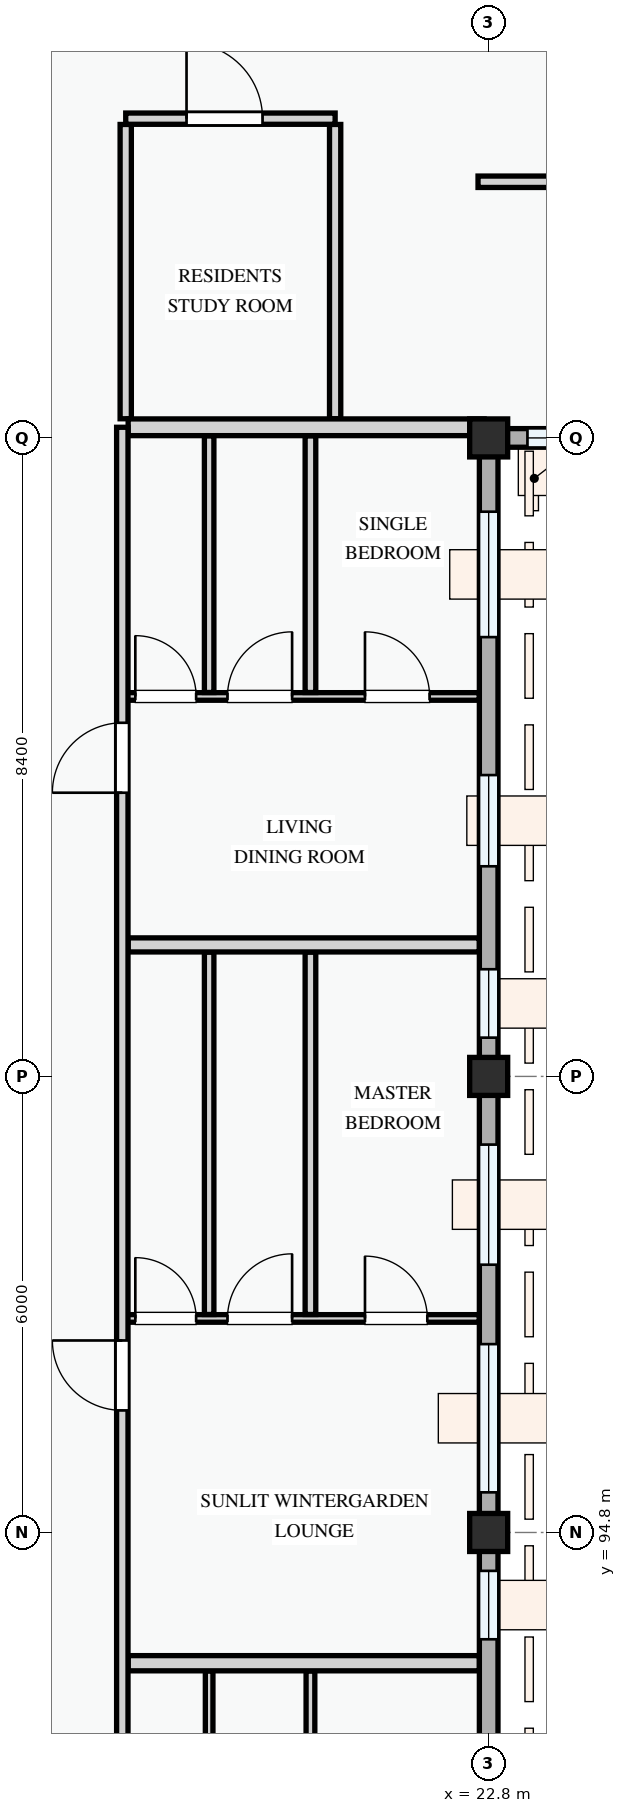
"""IFC4 building model, lengths in metres.
Left out: names, types, materials, properties, quantities, classifications, styles, units other than length and angle.
Written with IfcOpenShell. Run it as: python <this file> out.ifc"""

import sys

from ifc_helpers import new_model, si_unit, direction, frame, frame_2d, origin, origin_2d, place, context, subcontext, project, spatial, rectangle, extrude, element, fill, save


model = new_model("IFC4")
c1 = context("Model", 3, precision=1e-05, world=origin(), true_north=direction((0.0, 1.0)))
c2 = subcontext(c1, "Body", "Model", "MODEL_VIEW")
j1 = project(units=[si_unit("LENGTHUNIT", "METRE"), si_unit("PLANEANGLEUNIT", "RADIAN")], contexts=[c1])
p1 = place(None, origin())
s1 = spatial("IfcSite", under=j1, at=p1, CompositionType="ELEMENT")
p2 = place(p1, origin())
s2 = spatial("IfcBuilding", under=s1, at=p2, CompositionType="ELEMENT")
p3 = place(p2, frame((0.0, 0.0, 41.1)))
s3 = spatial("IfcBuildingStorey", under=s2, at=p3, CompositionType="ELEMENT", Elevation=41.1)
for number, where, z_axis, x_axis in (
    (1, (22.8, 94.8, 0.0), (0.0, 0.0, 1.0), (1.0, 0.0, 0.0)),
    (2, (22.8, 100.8, 0.0), (0.0, 0.0, 1.0), (1.0, 0.0, 0.0)),
    (3, (22.8, 109.2, 0.0), (0.0, 0.0, 1.0), (1.0, 0.0, 0.0)),
):
    element("IfcColumn", number, at=place(p3, frame(where, z_axis=z_axis, x_axis=x_axis)), inside=s3, PredefinedType="COLUMN", context=c2, shape_type="SweptSolid", body=[
        extrude(rectangle(XDim=0.5, YDim=0.5, at=origin_2d()), origin(), (0.0, 0.0, 1.0), 3.3),
    ])
p4 = place(p3, frame((22.8, 109.2, 0.0), z_axis=(0.0, 0.0, 1.0), x_axis=(1.0, 0.0, 0.0)))
e4 = element("IfcWall", 4, at=p4, inside=s3, PredefinedType="STANDARD", context=c2, shape_type="SweptSolid", body=[
    extrude(rectangle(XDim=6.0, YDim=0.245, at=frame_2d((3.0, 0.0))), origin(), (0.0, 0.0, 1.0), 2.525),
])
p5 = place(p4, frame((0.51, 0.0, 0.78)))
e5 = element("IfcOpeningElement", 5, at=p5, cuts=e4, PredefinedType="OPENING", context=c2, shape_type="SweptSolid", body=[
    extrude(rectangle(XDim=1.52, YDim=1.42, at=frame_2d((0.76, 0.71))), frame((0.0, 0.133, 0.0), z_axis=(0.0, -1.0, 0.0), x_axis=(1.0, 0.0, 0.0)), (0.0, 0.0, 1.0), 0.265),
])
p6 = place(p4, frame((2.955, 0.0, 0.78)))
e6 = element("IfcOpeningElement", 6, at=p6, cuts=e4, PredefinedType="OPENING", context=c2, shape_type="SweptSolid", body=[
    extrude(rectangle(XDim=2.25, YDim=1.6, at=frame_2d((1.125, 0.8))), frame((0.0, 0.133, 0.0), z_axis=(0.0, -1.0, 0.0), x_axis=(1.0, 0.0, 0.0)), (0.0, 0.0, 1.0), 0.265),
])
p7 = place(p3, frame((22.8, 86.4, 0.0), z_axis=(0.0, 0.0, 1.0), x_axis=(0.0, 1.0, 0.0)))
e7 = element("IfcWall", 7, at=p7, inside=s3, PredefinedType="STANDARD", context=c2, shape_type="SweptSolid", body=[
    extrude(rectangle(XDim=8.4, YDim=0.245, at=frame_2d((4.2, 0.0))), origin(), (0.0, 0.0, 1.0), 2.425),
])
p8 = place(p7, frame((0.814, 0.0, 0.78)))
e8 = element("IfcOpeningElement", 8, at=p8, cuts=e7, PredefinedType="OPENING", context=c2, shape_type="SweptSolid", body=[
    extrude(rectangle(XDim=1.8, YDim=1.5, at=frame_2d((0.9, 0.75))), frame((0.0, 0.133, 0.0), z_axis=(0.0, -1.0, 0.0), x_axis=(1.0, 0.0, 0.0)), (0.0, 0.0, 1.0), 0.265),
])
p9 = place(p7, frame((4.409, 0.0, 0.78)))
e9 = element("IfcOpeningElement", 9, at=p9, cuts=e7, PredefinedType="OPENING", context=c2, shape_type="SweptSolid", body=[
    extrude(rectangle(XDim=1.1, YDim=1.3, at=frame_2d((0.55, 0.65))), frame((0.0, 0.133, 0.0), z_axis=(0.0, -1.0, 0.0), x_axis=(1.0, 0.0, 0.0)), (0.0, 0.0, 1.0), 0.265),
])
p10 = place(p7, frame((6.995, 0.0, 0.78)))
e10 = element("IfcOpeningElement", 10, at=p10, cuts=e7, PredefinedType="OPENING", context=c2, shape_type="SweptSolid", body=[
    extrude(rectangle(XDim=0.9, YDim=1.2, at=frame_2d((0.45, 0.6))), frame((0.0, 0.133, 0.0), z_axis=(0.0, -1.0, 0.0), x_axis=(1.0, 0.0, 0.0)), (0.0, 0.0, 1.0), 0.265),
])
p11 = place(p3, frame((22.8, 94.8, 0.0), z_axis=(0.0, 0.0, 1.0), x_axis=(0.0, 1.0, 0.0)))
e11 = element("IfcWall", 11, at=p11, inside=s3, PredefinedType="STANDARD", context=c2, shape_type="SweptSolid", body=[
    extrude(rectangle(XDim=6.0, YDim=0.245, at=frame_2d((3.0, 0.0))), origin(), (0.0, 0.0, 1.0), 2.575),
])
p12 = place(p11, frame((0.528, 0.0, 0.78)))
e12 = element("IfcOpeningElement", 12, at=p12, cuts=e11, PredefinedType="OPENING", context=c2, shape_type="SweptSolid", body=[
    extrude(rectangle(XDim=1.95, YDim=1.65, at=frame_2d((0.975, 0.825))), frame((0.0, 0.133, 0.0), z_axis=(0.0, -1.0, 0.0), x_axis=(1.0, 0.0, 0.0)), (0.0, 0.0, 1.0), 0.265),
])
p13 = place(p11, frame((3.523, 0.0, 0.78)))
e13 = element("IfcOpeningElement", 13, at=p13, cuts=e11, PredefinedType="OPENING", context=c2, shape_type="SweptSolid", body=[
    extrude(rectangle(XDim=1.58, YDim=1.48, at=frame_2d((0.79, 0.74))), frame((0.0, 0.133, 0.0), z_axis=(0.0, -1.0, 0.0), x_axis=(1.0, 0.0, 0.0)), (0.0, 0.0, 1.0), 0.265),
])
p14 = place(p3, frame((22.8, 100.8, 0.0), z_axis=(0.0, 0.0, 1.0), x_axis=(0.0, 1.0, 0.0)))
e14 = element("IfcWall", 14, at=p14, inside=s3, PredefinedType="STANDARD", context=c2, shape_type="SweptSolid", body=[
    extrude(rectangle(XDim=8.4, YDim=0.245, at=frame_2d((4.2, 0.0))), origin(), (0.0, 0.0, 1.0), 2.425),
])
p15 = place(p14, frame((0.51, 0.0, 0.78)))
e15 = element("IfcOpeningElement", 15, at=p15, cuts=e14, PredefinedType="OPENING", context=c2, shape_type="SweptSolid", body=[
    extrude(rectangle(XDim=0.9, YDim=1.2, at=frame_2d((0.45, 0.6))), frame((0.0, 0.133, 0.0), z_axis=(0.0, -1.0, 0.0), x_axis=(1.0, 0.0, 0.0)), (0.0, 0.0, 1.0), 0.265),
])
p16 = place(p14, frame((2.764, 0.0, 0.78)))
e16 = element("IfcOpeningElement", 16, at=p16, cuts=e14, PredefinedType="OPENING", context=c2, shape_type="SweptSolid", body=[
    extrude(rectangle(XDim=1.2, YDim=1.5, at=frame_2d((0.6, 0.75))), frame((0.0, 0.133, 0.0), z_axis=(0.0, -1.0, 0.0), x_axis=(1.0, 0.0, 0.0)), (0.0, 0.0, 1.0), 0.265),
])
p17 = place(p14, frame((5.779, 0.0, 0.78)))
e17 = element("IfcOpeningElement", 17, at=p17, cuts=e14, PredefinedType="OPENING", context=c2, shape_type="SweptSolid", body=[
    extrude(rectangle(XDim=1.65, YDim=1.5, at=frame_2d((0.825, 0.75))), frame((0.0, 0.133, 0.0), z_axis=(0.0, -1.0, 0.0), x_axis=(1.0, 0.0, 0.0)), (0.0, 0.0, 1.0), 0.265),
])
for number, where, z_axis, x_axis in (
    (18, (18.025, 113.324, 0.0), (0.0, 0.0, 1.0), (0.0, -1.0, 0.0)),
    (19, (20.78, 113.324, 0.0), (0.0, 0.0, 1.0), (0.0, -1.0, 0.0)),
):
    element("IfcWall", number, at=place(p3, frame(where, z_axis=z_axis, x_axis=x_axis)), inside=s3, PredefinedType="PARTITIONING", context=c2, shape_type="SweptSolid", body=[
        extrude(rectangle(XDim=3.872, YDim=0.148, at=frame_2d((1.936, 0.0))), origin(), (0.0, 0.0, 1.0), 3.0),
    ])
p18 = place(p3, frame((18.025, 113.4, 0.0), z_axis=(0.0, 0.0, 1.0), x_axis=(1.0, 0.0, 0.0)))
e20 = element("IfcWall", 20, at=p18, inside=s3, PredefinedType="PARTITIONING", context=c2, shape_type="SweptSolid", body=[
    extrude(rectangle(XDim=2.755, YDim=0.148, at=frame_2d((1.377, 0.0))), origin(), (0.0, 0.0, 1.0), 3.0),
])
p19 = place(p18, frame((0.8, 0.0, 0.0)))
e21 = element("IfcOpeningElement", 21, at=p19, cuts=e20, PredefinedType="OPENING", context=c2, shape_type="SweptSolid", body=[
    extrude(rectangle(XDim=1.0, YDim=2.15, at=frame_2d((0.5, 1.075))), frame((0.0, 0.084, 0.0), z_axis=(0.0, -1.0, 0.0), x_axis=(1.0, 0.0, 0.0)), (0.0, 0.0, 1.0), 0.168),
])
p20 = place(p3, frame((22.66, 112.57, 0.0), z_axis=(0.0, 0.0, 1.0), x_axis=(1.0, 0.0, 0.0)))
e22 = element("IfcWall", 22, at=p20, inside=s3, PredefinedType="PARTITIONING", context=c2, shape_type="SweptSolid", body=[
    extrude(rectangle(XDim=2.406, YDim=0.15, at=frame_2d((1.203, 0.0))), origin(), (0.0, 0.0, 1.0), 3.0),
])
p21 = place(p3, frame((20.455, 89.702, 0.0), z_axis=(0.0, 0.0, 1.0), x_axis=(0.0, 1.0, 0.0)))
e23 = element("IfcWall", 23, at=p21, inside=s3, PredefinedType="PARTITIONING", context=c2, shape_type="SweptSolid", body=[
    extrude(rectangle(XDim=3.276, YDim=0.115, at=frame_2d((1.638, 0.0))), origin(), (0.0, 0.0, 1.0), 3.0),
])
p22 = place(p3, frame((19.122, 89.702, 0.0), z_axis=(0.0, 0.0, 1.0), x_axis=(0.0, 1.0, 0.0)))
e24 = element("IfcWall", 24, at=p22, inside=s3, PredefinedType="PARTITIONING", context=c2, shape_type="SweptSolid", body=[
    extrude(rectangle(XDim=3.276, YDim=0.1, at=frame_2d((1.638, 0.0))), origin(), (0.0, 0.0, 1.0), 3.0),
])
p23 = place(p3, frame((17.98, 97.616, 0.0), z_axis=(0.0, 0.0, 1.0), x_axis=(1.0, 0.0, 0.0)))
e25 = element("IfcWall", 25, at=p23, inside=s3, PredefinedType="PARTITIONING", context=c2, shape_type="SweptSolid", body=[
    extrude(rectangle(XDim=4.696, YDim=0.1, at=frame_2d((2.348, 0.0))), origin(), (0.0, 0.0, 1.0), 3.0),
])
p24 = place(p23, frame((0.171, 0.0, 0.0)))
e26 = element("IfcOpeningElement", 26, at=p24, cuts=e25, PredefinedType="OPENING", context=c2, shape_type="SweptSolid", body=[
    extrude(rectangle(XDim=0.8, YDim=2.1, at=frame_2d((0.4, 1.05))), frame((0.0, 0.06, 0.0), z_axis=(0.0, -1.0, 0.0), x_axis=(1.0, 0.0, 0.0)), (0.0, 0.0, 1.0), 0.12),
])
p25 = place(p23, frame((1.384, 0.0, 0.0)))
e27 = element("IfcOpeningElement", 27, at=p25, cuts=e25, PredefinedType="OPENING", context=c2, shape_type="SweptSolid", body=[
    extrude(rectangle(XDim=0.85, YDim=2.1, at=frame_2d((0.425, 1.05))), frame((0.0, 0.06, 0.0), z_axis=(0.0, -1.0, 0.0), x_axis=(1.0, 0.0, 0.0)), (0.0, 0.0, 1.0), 0.12),
])
p26 = place(p23, frame((3.193, 0.0, 0.0)))
e28 = element("IfcOpeningElement", 28, at=p26, cuts=e25, PredefinedType="OPENING", context=c2, shape_type="SweptSolid", body=[
    extrude(rectangle(XDim=0.82, YDim=2.08, at=frame_2d((0.41, 1.04))), frame((0.0, 0.06, 0.0), z_axis=(0.0, -1.0, 0.0), x_axis=(1.0, 0.0, 0.0)), (0.0, 0.0, 1.0), 0.12),
])
p27 = place(p3, frame((20.455, 97.668, 0.0), z_axis=(0.0, 0.0, 1.0), x_axis=(0.0, 1.0, 0.0)))
e29 = element("IfcWall", 29, at=p27, inside=s3, PredefinedType="PARTITIONING", context=c2, shape_type="SweptSolid", body=[
    extrude(rectangle(XDim=4.768, YDim=0.14, at=frame_2d((2.384, 0.0))), origin(), (0.0, 0.0, 1.0), 3.0),
])
p28 = place(p3, frame((19.122, 97.668, 0.0), z_axis=(0.0, 0.0, 1.0), x_axis=(0.0, 1.0, 0.0)))
e30 = element("IfcWall", 30, at=p28, inside=s3, PredefinedType="PARTITIONING", context=c2, shape_type="SweptSolid", body=[
    extrude(rectangle(XDim=4.768, YDim=0.125, at=frame_2d((2.384, 0.0))), origin(), (0.0, 0.0, 1.0), 3.0),
])
p29 = place(p3, frame((18.057, 93.08, 0.0), z_axis=(0.0, 0.0, 1.0), x_axis=(1.0, 0.0, 0.0)))
e31 = element("IfcWall", 31, at=p29, inside=s3, PredefinedType="PARTITIONING", context=c2, shape_type="SweptSolid", body=[
    extrude(rectangle(XDim=4.619, YDim=0.2, at=frame_2d((2.309, 0.0))), origin(), (0.0, 0.0, 1.0), 3.0),
])
p30 = place(p3, frame((17.98, 105.799, 0.0), z_axis=(0.0, 0.0, 1.0), x_axis=(1.0, 0.0, 0.0)))
e32 = element("IfcWall", 32, at=p30, inside=s3, PredefinedType="PARTITIONING", context=c2, shape_type="SweptSolid", body=[
    extrude(rectangle(XDim=4.696, YDim=0.1, at=frame_2d((2.348, 0.0))), origin(), (0.0, 0.0, 1.0), 3.0),
])
p31 = place(p30, frame((0.171, 0.0, 0.0)))
e33 = element("IfcOpeningElement", 33, at=p31, cuts=e32, PredefinedType="OPENING", context=c2, shape_type="SweptSolid", body=[
    extrude(rectangle(XDim=0.8, YDim=2.1, at=frame_2d((0.4, 1.05))), frame((0.0, 0.06, 0.0), z_axis=(0.0, -1.0, 0.0), x_axis=(1.0, 0.0, 0.0)), (0.0, 0.0, 1.0), 0.12),
])
p32 = place(p30, frame((1.384, 0.0, 0.0)))
e34 = element("IfcOpeningElement", 34, at=p32, cuts=e32, PredefinedType="OPENING", context=c2, shape_type="SweptSolid", body=[
    extrude(rectangle(XDim=0.85, YDim=2.1, at=frame_2d((0.425, 1.05))), frame((0.0, 0.06, 0.0), z_axis=(0.0, -1.0, 0.0), x_axis=(1.0, 0.0, 0.0)), (0.0, 0.0, 1.0), 0.12),
])
p33 = place(p30, frame((3.193, 0.0, 0.0)))
e35 = element("IfcOpeningElement", 35, at=p33, cuts=e32, PredefinedType="OPENING", context=c2, shape_type="SweptSolid", body=[
    extrude(rectangle(XDim=0.85, YDim=2.1, at=frame_2d((0.425, 1.05))), frame((0.0, 0.06, 0.0), z_axis=(0.0, -1.0, 0.0), x_axis=(1.0, 0.0, 0.0)), (0.0, 0.0, 1.0), 0.12),
])
p34 = place(p3, frame((20.455, 105.851, 0.0), z_axis=(0.0, 0.0, 1.0), x_axis=(0.0, 1.0, 0.0)))
e36 = element("IfcWall", 36, at=p34, inside=s3, PredefinedType="PARTITIONING", context=c2, shape_type="SweptSolid", body=[
    extrude(rectangle(XDim=3.377, YDim=0.14, at=frame_2d((1.688, 0.0))), origin(), (0.0, 0.0, 1.0), 3.0),
])
p35 = place(p3, frame((19.122, 105.851, 0.0), z_axis=(0.0, 0.0, 1.0), x_axis=(0.0, 1.0, 0.0)))
e37 = element("IfcWall", 37, at=p35, inside=s3, PredefinedType="PARTITIONING", context=c2, shape_type="SweptSolid", body=[
    extrude(rectangle(XDim=3.377, YDim=0.125, at=frame_2d((1.688, 0.0))), origin(), (0.0, 0.0, 1.0), 3.0),
])
p36 = place(p3, frame((18.057, 102.53, 0.0), z_axis=(0.0, 0.0, 1.0), x_axis=(1.0, 0.0, 0.0)))
e38 = element("IfcWall", 38, at=p36, inside=s3, PredefinedType="PARTITIONING", context=c2, shape_type="SweptSolid", body=[
    extrude(rectangle(XDim=4.619, YDim=0.185, at=frame_2d((2.309, 0.0))), origin(), (0.0, 0.0, 1.0), 3.0),
])
p37 = place(p3, frame((18.057, 109.34, 0.0), z_axis=(0.0, 0.0, 1.0), x_axis=(1.0, 0.0, 0.0)))
e39 = element("IfcWall", 39, at=p37, inside=s3, PredefinedType="PARTITIONING", context=c2, shape_type="SweptSolid", body=[
    extrude(rectangle(XDim=4.683, YDim=0.22, at=frame_2d((2.342, 0.0))), origin(), (0.0, 0.0, 1.0), 2.375),
])
p38 = place(p3, frame((17.98, 86.524, 0.0), z_axis=(0.0, 0.0, 1.0), x_axis=(0.0, 1.0, 0.0)))
e40 = element("IfcWall", 40, at=p38, inside=s3, PredefinedType="PARTITIONING", context=c2, shape_type="SweptSolid", body=[
    extrude(rectangle(XDim=22.816, YDim=0.15, at=frame_2d((11.408, 0.0))), origin(), (0.0, 0.0, 1.0), 3.0),
])
p39 = place(p38, frame((1.903, 0.0, 0.0)))
e41 = element("IfcOpeningElement", 41, at=p39, cuts=e40, PredefinedType="OPENING", context=c2, shape_type="SweptSolid", body=[
    extrude(rectangle(XDim=0.92, YDim=2.1, at=frame_2d((0.46, 1.05))), frame((0.0, 0.085, 0.0), z_axis=(0.0, -1.0, 0.0), x_axis=(1.0, 0.0, 0.0)), (0.0, 0.0, 1.0), 0.17),
])
p40 = place(p38, frame((9.882, 0.0, 0.0)))
e42 = element("IfcOpeningElement", 42, at=p40, cuts=e40, PredefinedType="OPENING", context=c2, shape_type="SweptSolid", body=[
    extrude(rectangle(XDim=0.92, YDim=2.1, at=frame_2d((0.46, 1.05))), frame((0.0, 0.085, 0.0), z_axis=(0.0, -1.0, 0.0), x_axis=(1.0, 0.0, 0.0)), (0.0, 0.0, 1.0), 0.17),
])
p41 = place(p38, frame((18.008, 0.0, 0.0)))
e43 = element("IfcOpeningElement", 43, at=p41, cuts=e40, PredefinedType="OPENING", context=c2, shape_type="SweptSolid", body=[
    extrude(rectangle(XDim=0.92, YDim=2.1, at=frame_2d((0.46, 1.05))), frame((0.0, 0.085, 0.0), z_axis=(0.0, -1.0, 0.0), x_axis=(1.0, 0.0, 0.0)), (0.0, 0.0, 1.0), 0.17),
])
p42 = place(p5, origin())
e44 = element("IfcWindow", 44, at=p42, inside=s3, PartitioningType="SINGLE_PANEL", PredefinedType="WINDOW", context=c2, shape_type="SweptSolid", body=[
    extrude(rectangle(XDim=1.52, YDim=1.42, at=frame_2d((0.76, 0.71))), frame((0.0, 0.03, 0.0), z_axis=(0.0, -1.0, 0.0), x_axis=(1.0, 0.0, 0.0)), (0.0, 0.0, 1.0), 0.06),
])
fill(e5, e44)
p43 = place(p10, origin())
e45 = element("IfcWindow", 45, at=p43, inside=s3, PartitioningType="SINGLE_PANEL", PredefinedType="WINDOW", context=c2, shape_type="SweptSolid", body=[
    extrude(rectangle(XDim=0.9, YDim=1.2, at=frame_2d((0.45, 0.6))), frame((0.0, 0.03, 0.0), z_axis=(0.0, -1.0, 0.0), x_axis=(1.0, 0.0, 0.0)), (0.0, 0.0, 1.0), 0.06),
])
fill(e10, e45)
p44 = place(p12, origin())
e46 = element("IfcWindow", 46, at=p44, inside=s3, PartitioningType="DOUBLE_PANEL_VERTICAL", PredefinedType="WINDOW", context=c2, shape_type="SweptSolid", body=[
    extrude(rectangle(XDim=1.95, YDim=1.65, at=frame_2d((0.975, 0.825))), frame((0.0, 0.03, 0.0), z_axis=(0.0, -1.0, 0.0), x_axis=(1.0, 0.0, 0.0)), (0.0, 0.0, 1.0), 0.06),
])
fill(e12, e46)
p45 = place(p13, origin())
e47 = element("IfcWindow", 47, at=p45, inside=s3, PartitioningType="SINGLE_PANEL", PredefinedType="WINDOW", context=c2, shape_type="SweptSolid", body=[
    extrude(rectangle(XDim=1.58, YDim=1.48, at=frame_2d((0.79, 0.74))), frame((0.0, 0.03, 0.0), z_axis=(0.0, -1.0, 0.0), x_axis=(1.0, 0.0, 0.0)), (0.0, 0.0, 1.0), 0.06),
])
fill(e13, e47)
p46 = place(p15, origin())
e48 = element("IfcWindow", 48, at=p46, inside=s3, PartitioningType="SINGLE_PANEL", PredefinedType="WINDOW", context=c2, shape_type="SweptSolid", body=[
    extrude(rectangle(XDim=0.9, YDim=1.2, at=frame_2d((0.45, 0.6))), frame((0.0, 0.03, 0.0), z_axis=(0.0, -1.0, 0.0), x_axis=(1.0, 0.0, 0.0)), (0.0, 0.0, 1.0), 0.06),
])
fill(e15, e48)
p47 = place(p16, origin())
e49 = element("IfcWindow", 49, at=p47, inside=s3, PartitioningType="SINGLE_PANEL", PredefinedType="WINDOW", context=c2, shape_type="SweptSolid", body=[
    extrude(rectangle(XDim=1.2, YDim=1.5, at=frame_2d((0.6, 0.75))), frame((0.0, 0.03, 0.0), z_axis=(0.0, -1.0, 0.0), x_axis=(1.0, 0.0, 0.0)), (0.0, 0.0, 1.0), 0.06),
])
fill(e16, e49)
p48 = place(p17, origin())
e50 = element("IfcWindow", 50, at=p48, inside=s3, PartitioningType="DOUBLE_PANEL_VERTICAL", PredefinedType="WINDOW", context=c2, shape_type="SweptSolid", body=[
    extrude(rectangle(XDim=1.65, YDim=1.5, at=frame_2d((0.825, 0.75))), frame((0.0, 0.03, 0.0), z_axis=(0.0, -1.0, 0.0), x_axis=(1.0, 0.0, 0.0)), (0.0, 0.0, 1.0), 0.06),
])
fill(e17, e50)
p49 = place(p19, origin())
e51 = element("IfcDoor", 51, at=p49, inside=s3, OperationType="SINGLE_SWING_LEFT", PredefinedType="DOOR", context=c2, shape_type="SweptSolid", body=[
    extrude(rectangle(XDim=1.0, YDim=2.15, at=frame_2d((0.5, 1.075))), frame((0.0, 0.025, 0.0), z_axis=(0.0, -1.0, 0.0), x_axis=(1.0, 0.0, 0.0)), (0.0, 0.0, 1.0), 0.05),
])
fill(e21, e51)
p50 = place(p24, origin())
e52 = element("IfcDoor", 52, at=p50, inside=s3, OperationType="SINGLE_SWING_LEFT", PredefinedType="DOOR", context=c2, shape_type="SweptSolid", body=[
    extrude(rectangle(XDim=0.8, YDim=2.1, at=frame_2d((0.4, 1.05))), frame((0.0, 0.025, 0.0), z_axis=(0.0, -1.0, 0.0), x_axis=(1.0, 0.0, 0.0)), (0.0, 0.0, 1.0), 0.05),
])
fill(e26, e52)
p51 = place(p25, origin())
e53 = element("IfcDoor", 53, at=p51, inside=s3, OperationType="SINGLE_SWING_RIGHT", PredefinedType="DOOR", context=c2, shape_type="SweptSolid", body=[
    extrude(rectangle(XDim=0.85, YDim=2.1, at=frame_2d((0.425, 1.05))), frame((0.0, 0.025, 0.0), z_axis=(0.0, -1.0, 0.0), x_axis=(1.0, 0.0, 0.0)), (0.0, 0.0, 1.0), 0.05),
])
fill(e27, e53)
p52 = place(p26, origin())
e54 = element("IfcDoor", 54, at=p52, inside=s3, OperationType="SINGLE_SWING_LEFT", PredefinedType="DOOR", context=c2, shape_type="SweptSolid", body=[
    extrude(rectangle(XDim=0.82, YDim=2.08, at=frame_2d((0.41, 1.04))), frame((0.0, 0.025, 0.0), z_axis=(0.0, -1.0, 0.0), x_axis=(1.0, 0.0, 0.0)), (0.0, 0.0, 1.0), 0.05),
])
fill(e28, e54)
p53 = place(p31, origin())
e55 = element("IfcDoor", 55, at=p53, inside=s3, OperationType="SINGLE_SWING_LEFT", PredefinedType="DOOR", context=c2, shape_type="SweptSolid", body=[
    extrude(rectangle(XDim=0.8, YDim=2.1, at=frame_2d((0.4, 1.05))), frame((0.0, 0.025, 0.0), z_axis=(0.0, -1.0, 0.0), x_axis=(1.0, 0.0, 0.0)), (0.0, 0.0, 1.0), 0.05),
])
fill(e33, e55)
p54 = place(p32, origin())
e56 = element("IfcDoor", 56, at=p54, inside=s3, OperationType="SINGLE_SWING_RIGHT", PredefinedType="DOOR", context=c2, shape_type="SweptSolid", body=[
    extrude(rectangle(XDim=0.85, YDim=2.1, at=frame_2d((0.425, 1.05))), frame((0.0, 0.025, 0.0), z_axis=(0.0, -1.0, 0.0), x_axis=(1.0, 0.0, 0.0)), (0.0, 0.0, 1.0), 0.05),
])
fill(e34, e56)
p55 = place(p33, origin())
e57 = element("IfcDoor", 57, at=p55, inside=s3, OperationType="SINGLE_SWING_LEFT", PredefinedType="DOOR", context=c2, shape_type="SweptSolid", body=[
    extrude(rectangle(XDim=0.85, YDim=2.1, at=frame_2d((0.425, 1.05))), frame((0.0, 0.025, 0.0), z_axis=(0.0, -1.0, 0.0), x_axis=(1.0, 0.0, 0.0)), (0.0, 0.0, 1.0), 0.05),
])
fill(e35, e57)
p56 = place(p40, origin())
e58 = element("IfcDoor", 58, at=p56, inside=s3, OperationType="SINGLE_SWING_RIGHT", PredefinedType="DOOR", context=c2, shape_type="SweptSolid", body=[
    extrude(rectangle(XDim=0.92, YDim=2.1, at=frame_2d((0.46, 1.05))), frame((0.0, 0.025, 0.0), z_axis=(0.0, -1.0, 0.0), x_axis=(1.0, 0.0, 0.0)), (0.0, 0.0, 1.0), 0.05),
])
fill(e42, e58)
p57 = place(p41, origin())
e59 = element("IfcDoor", 59, at=p57, inside=s3, OperationType="SINGLE_SWING_LEFT", PredefinedType="DOOR", context=c2, shape_type="SweptSolid", body=[
    extrude(rectangle(XDim=0.92, YDim=2.1, at=frame_2d((0.46, 1.05))), frame((0.0, 0.025, 0.0), z_axis=(0.0, -1.0, 0.0), x_axis=(1.0, 0.0, 0.0)), (0.0, 0.0, 1.0), 0.05),
])
fill(e43, e59)
save(model, sys.argv[1])
